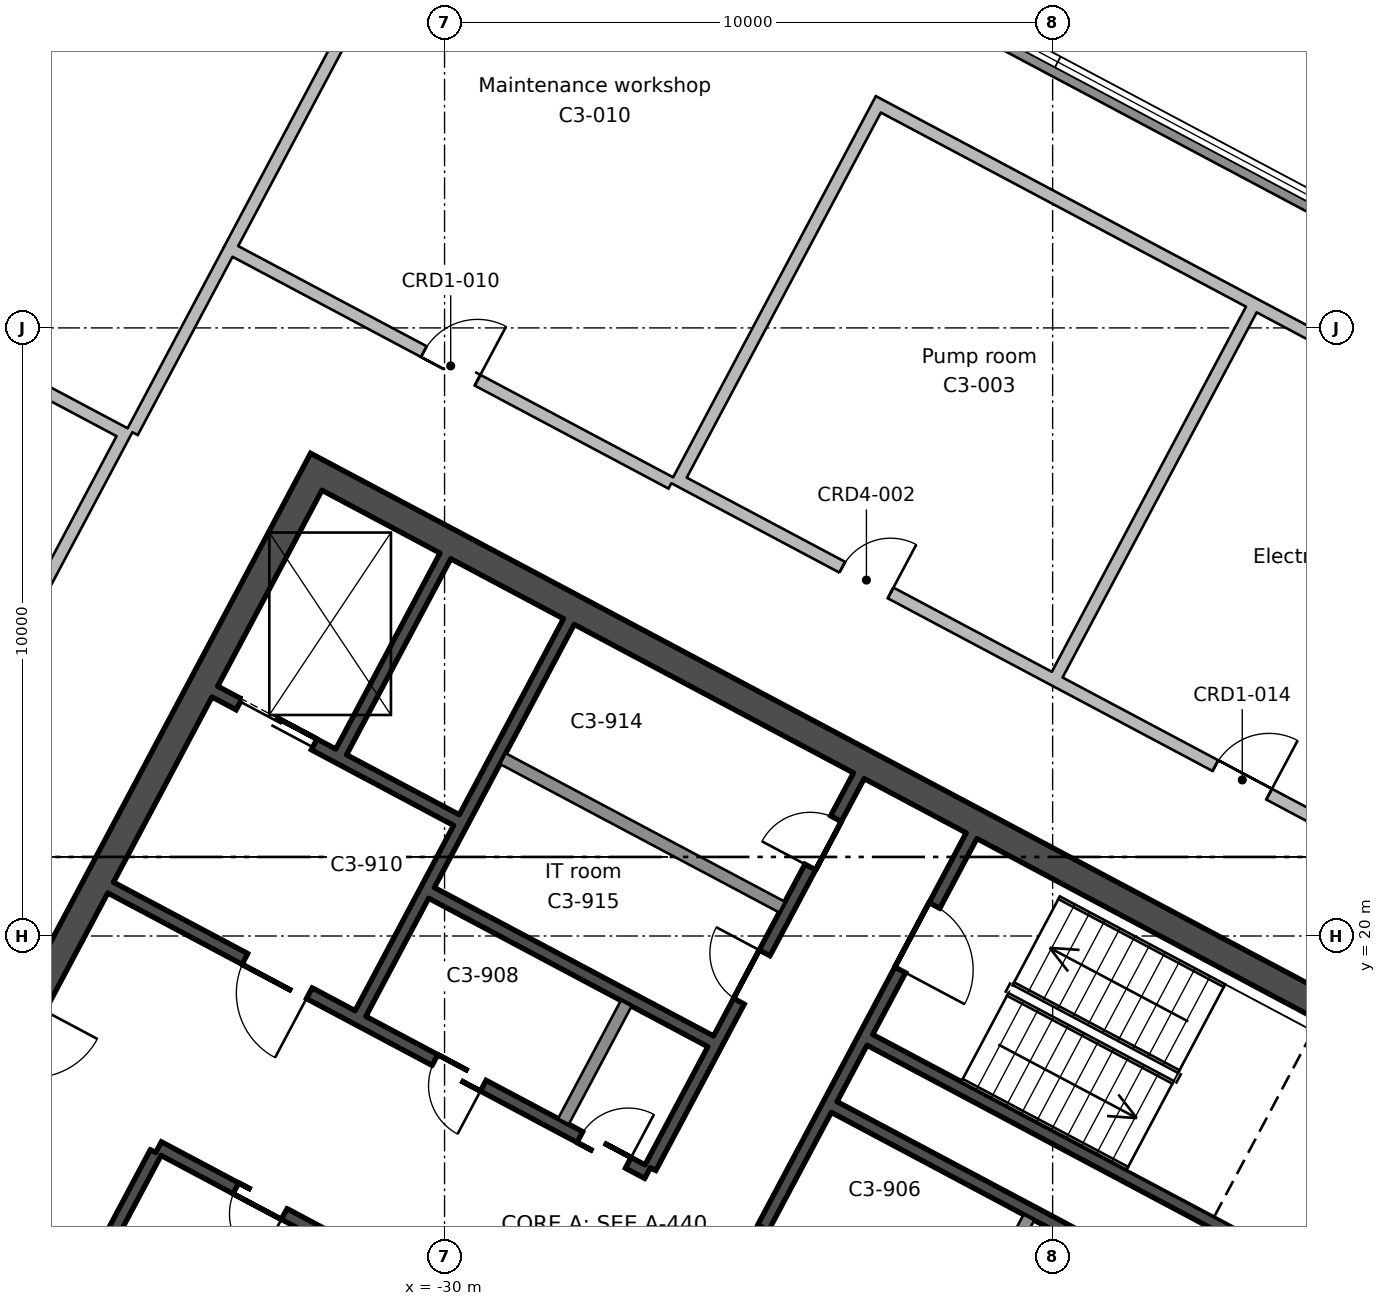
"""IFC4 building model, lengths in metres.
Left out: names, types, materials, properties, quantities, classifications, styles, units other than length and angle.
Written with IfcOpenShell. Run it as: python <this file> out.ifc"""

import sys

from ifc_helpers import new_model, si_unit, direction, frame, frame_2d, origin, place, context, subcontext, project, spatial, rectangle, extrude, element, fill, save


model = new_model("IFC4")
c1 = context("Model", 3, precision=1e-05, world=origin(), true_north=direction((0.0, 1.0)))
c2 = subcontext(c1, "Body", "Model", "MODEL_VIEW")
j1 = project(units=[si_unit("LENGTHUNIT", "METRE"), si_unit("PLANEANGLEUNIT", "RADIAN")], contexts=[c1])
p1 = place(None, origin())
s1 = spatial("IfcSite", under=j1, at=p1, CompositionType="ELEMENT")
p2 = place(p1, origin())
s2 = spatial("IfcBuilding", under=s1, at=p2, CompositionType="ELEMENT")
p3 = place(p2, frame((0.0, 0.0, 336.6)))
s3 = spatial("IfcBuildingStorey", under=s2, at=p3, CompositionType="ELEMENT", Elevation=336.6)
p4 = place(p3, frame((-13.771, 18.138, 0.0), z_axis=(0.0, 0.0, 1.0), x_axis=(-0.469467968382, -0.882949504028, 0.0)))
e1 = element("IfcWall", 1, at=p4, inside=s3, PredefinedType="SHEAR", context=c2, shape_type="SweptSolid", body=[
    extrude(rectangle(XDim=19.1, YDim=0.45, at=frame_2d((9.55, 0.0))), origin(), (0.0, 0.0, 1.0), 4.2),
])
p5 = place(p4, frame((6.55, 0.0, 0.0)))
e2 = element("IfcOpeningElement", 2, at=p5, cuts=e1, PredefinedType="OPENING", context=c2, shape_type="SweptSolid", body=[
    extrude(rectangle(XDim=2.4, YDim=2.4, at=frame_2d((1.2, 1.2))), frame((0.0, 0.235, 0.0), z_axis=(0.0, -1.0, 0.0), x_axis=(1.0, 0.0, 0.0)), (0.0, 0.0, 1.0), 0.47),
])
p6 = place(p3, frame((-32.004, 27.833, 0.0), z_axis=(0.0, 0.0, 1.0), x_axis=(-0.469467968382, -0.882949504028, 0.0)))
e3 = element("IfcWall", 3, at=p6, inside=s3, PredefinedType="SHEAR", context=c2, shape_type="SweptSolid", body=[
    extrude(rectangle(XDim=19.1, YDim=0.45, at=frame_2d((9.55, 0.0))), origin(), (0.0, 0.0, 1.0), 4.2),
])
p7 = place(p6, frame((10.15, 0.0, 0.0)))
e4 = element("IfcOpeningElement", 4, at=p7, cuts=e3, PredefinedType="OPENING", context=c2, shape_type="SweptSolid", body=[
    extrude(rectangle(XDim=2.4, YDim=2.4, at=frame_2d((1.2, 1.2))), frame((0.0, 0.235, 0.0), z_axis=(0.0, -1.0, 0.0), x_axis=(1.0, 0.0, 0.0)), (0.0, 0.0, 1.0), 0.47),
])
p8 = place(p3, frame((-14.076, 18.045, 0.0), z_axis=(0.0, 0.0, 1.0), x_axis=(-0.882947755831, 0.46947125628, 0.0)))
e5 = element("IfcWall", 5, at=p8, inside=s3, PredefinedType="SHEAR", context=c2, shape_type="SweptSolid", body=[
    extrude(rectangle(XDim=20.2, YDim=0.45, at=frame_2d((10.1, 0.0))), origin(), (0.0, 0.0, 1.0), 4.2),
])
p9 = place(p3, frame((-20.39, 15.372, 0.0), z_axis=(0.0, 0.0, 1.0), x_axis=(-0.4694473164, -0.882960484464, 0.0)))
e6 = element("IfcWall", 6, at=p9, inside=s3, PredefinedType="SOLIDWALL", context=c2, shape_type="SweptSolid", body=[
    extrude(rectangle(XDim=2.2, YDim=0.2, at=frame_2d((1.1, 0.0))), origin(), (0.0, 0.0, 1.0), 4.2),
])
p10 = place(p3, frame((-21.333, 21.649, 0.0), z_axis=(0.0, 0.0, 1.0), x_axis=(-0.469494272526, -0.882935517501, 0.0)))
e7 = element("IfcWall", 7, at=p10, inside=s3, PredefinedType="SHEAR", context=c2, shape_type="SweptSolid", body=[
    extrude(rectangle(XDim=7.3, YDim=0.2, at=frame_2d((3.65, 0.0))), origin(), (0.0, 0.0, 1.0), 4.2),
])
p11 = place(p10, frame((1.3, 0.0, 0.0)))
e8 = element("IfcOpeningElement", 8, at=p11, cuts=e7, PredefinedType="OPENING", context=c2, shape_type="SweptSolid", body=[
    extrude(rectangle(XDim=1.2, YDim=2.1, at=frame_2d((0.6, 1.05))), frame((0.0, 0.11, 0.0), z_axis=(0.0, -1.0, 0.0), x_axis=(1.0, 0.0, 0.0)), (0.0, 0.0, 1.0), 0.22),
])
p12 = place(p3, frame((-23.188, 22.635, 0.0), z_axis=(0.0, 0.0, 1.0), x_axis=(-0.469454336211, -0.882956752176, 0.0)))
e9 = element("IfcWall", 9, at=p12, inside=s3, PredefinedType="SHEAR", context=c2, shape_type="SweptSolid", body=[
    extrude(rectangle(XDim=7.3, YDim=0.2, at=frame_2d((3.65, 0.0))), origin(), (0.0, 0.0, 1.0), 4.2),
])
p13 = place(p12, frame((0.8, 0.0, 0.0)))
e10 = element("IfcOpeningElement", 10, at=p13, cuts=e9, PredefinedType="OPENING", context=c2, shape_type="SweptSolid", body=[
    extrude(rectangle(XDim=0.9, YDim=2.1, at=frame_2d((0.45, 1.05))), frame((0.0, 0.11, 0.0), z_axis=(0.0, -1.0, 0.0), x_axis=(1.0, 0.0, 0.0)), (0.0, 0.0, 1.0), 0.22),
])
p14 = place(p12, frame((3.3, 0.0, 0.0)))
e11 = element("IfcOpeningElement", 11, at=p14, cuts=e9, PredefinedType="OPENING", context=c2, shape_type="SweptSolid", body=[
    extrude(rectangle(XDim=0.9, YDim=2.1, at=frame_2d((0.45, 1.05))), frame((0.0, 0.11, 0.0), z_axis=(0.0, -1.0, 0.0), x_axis=(1.0, 0.0, 0.0)), (0.0, 0.0, 1.0), 0.22),
])
p15 = place(p3, frame((-27.012, 18.893, 0.0), z_axis=(0.0, 0.0, 1.0), x_axis=(-0.4694473164, -0.882960484464, 0.0)))
e12 = element("IfcWall", 12, at=p15, inside=s3, PredefinedType="SOLIDWALL", context=c2, shape_type="SweptSolid", body=[
    extrude(rectangle(XDim=2.2, YDim=0.2, at=frame_2d((1.1, 0.0))), origin(), (0.0, 0.0, 1.0), 4.2),
])
p16 = place(p3, frame((-27.955, 25.171, 0.0), z_axis=(0.0, 0.0, 1.0), x_axis=(-0.469480409012, -0.88294288918, 0.0)))
e13 = element("IfcWall", 13, at=p16, inside=s3, PredefinedType="SHEAR", context=c2, shape_type="SweptSolid", body=[
    extrude(rectangle(XDim=7.3, YDim=0.2, at=frame_2d((3.65, 0.0))), origin(), (0.0, 0.0, 1.0), 4.2),
])
p17 = place(p3, frame((-34.75, 16.438, 0.0), z_axis=(0.0, 0.0, 1.0), x_axis=(-0.469401318492, -0.882984938828, 0.0)))
e14 = element("IfcWall", 14, at=p17, inside=s3, PredefinedType="SHEAR", context=c2, shape_type="SweptSolid", body=[
    extrude(rectangle(XDim=2.2, YDim=0.2, at=frame_2d((1.1, 0.0))), origin(), (0.0, 0.0, 1.0), 4.2),
])
p18 = place(p3, frame((-29.986, 26.25, 0.0), z_axis=(0.0, 0.0, 1.0), x_axis=(-0.469494272526, -0.882935517501, 0.0)))
e15 = element("IfcWall", 15, at=p18, inside=s3, PredefinedType="SHEAR", context=c2, shape_type="SweptSolid", body=[
    extrude(rectangle(XDim=3.65, YDim=0.2, at=frame_2d((1.825, 0.0))), origin(), (0.0, 0.0, 1.0), 4.2),
])
p19 = place(p3, frame((-24.449, 20.475, 0.0), z_axis=(0.0, 0.0, 1.0), x_axis=(-0.882934506056, 0.469496174655, 0.0)))
e16 = element("IfcWall", 16, at=p19, inside=s3, PredefinedType="SOLIDWALL", context=c2, shape_type="SweptSolid", body=[
    extrude(rectangle(XDim=5.2, YDim=0.2, at=frame_2d((2.6, 0.0))), origin(), (0.0, 0.0, 1.0), 4.2),
])
p20 = place(p3, frame((-15.942, 14.536, 0.0), z_axis=(0.0, 0.0, 1.0), x_axis=(-0.882946947542, 0.469472776449, 0.0)))
e17 = element("IfcWall", 17, at=p20, inside=s3, PredefinedType="SHEAR", context=c2, shape_type="SweptSolid", body=[
    extrude(rectangle(XDim=8.0, YDim=0.2, at=frame_2d((4.0, 0.0))), origin(), (0.0, 0.0, 1.0), 4.2),
])
p21 = place(p3, frame((-29.804, 21.906, 0.0), z_axis=(0.0, 0.0, 1.0), x_axis=(-0.882960433586, 0.469447412093, 0.0)))
e18 = element("IfcWall", 18, at=p21, inside=s3, PredefinedType="SHEAR", context=c2, shape_type="SweptSolid", body=[
    extrude(rectangle(XDim=4.5, YDim=0.2, at=frame_2d((2.25, 0.0))), origin(), (0.0, 0.0, 1.0), 4.2),
])
p22 = place(p21, frame((2.65, 0.0, 0.0)))
e19 = element("IfcOpeningElement", 19, at=p22, cuts=e18, PredefinedType="OPENING", context=c2, shape_type="SweptSolid", body=[
    extrude(rectangle(XDim=1.4, YDim=2.4, at=frame_2d((0.7, 1.2))), frame((0.0, 0.11, 0.0), z_axis=(0.0, -1.0, 0.0), x_axis=(1.0, 0.0, 0.0)), (0.0, 0.0, 1.0), 0.22),
])
p23 = place(p3, frame((-16.529, 13.432, 0.0), z_axis=(0.0, 0.0, 1.0), x_axis=(-0.88295287151, 0.469461634952, 0.0)))
e20 = element("IfcWall", 20, at=p23, inside=s3, PredefinedType="SHEAR", context=c2, shape_type="SweptSolid", body=[
    extrude(rectangle(XDim=8.0, YDim=0.2, at=frame_2d((4.0, 0.0))), origin(), (0.0, 0.0, 1.0), 4.2),
])
p24 = place(p3, frame((-25.623, 18.268, 0.0), z_axis=(0.0, 0.0, 1.0), x_axis=(-0.882953967957, 0.469459572775, 0.0)))
e21 = element("IfcWall", 21, at=p24, inside=s3, PredefinedType="SHEAR", context=c2, shape_type="SweptSolid", body=[
    extrude(rectangle(XDim=5.2, YDim=0.2, at=frame_2d((2.6, 0.0))), origin(), (0.0, 0.0, 1.0), 4.2),
])
p25 = place(p3, frame((-26.662, 16.102, 0.0), z_axis=(0.0, 0.0, 1.0), x_axis=(-0.882940221191, 0.469485426614, 0.0)))
e22 = element("IfcWall", 22, at=p25, inside=s3, PredefinedType="SHEAR", context=c2, shape_type="SweptSolid", body=[
    extrude(rectangle(XDim=10.0, YDim=0.2, at=frame_2d((5.0, 0.0))), origin(), (0.0, 0.0, 1.0), 4.2),
])
p26 = place(p25, frame((6.3, 0.0, 0.0)))
e23 = element("IfcOpeningElement", 23, at=p26, cuts=e22, PredefinedType="OPENING", context=c2, shape_type="SweptSolid", body=[
    extrude(rectangle(XDim=1.2, YDim=2.1, at=frame_2d((0.6, 1.05))), frame((0.0, 0.11, 0.0), z_axis=(0.0, -1.0, 0.0), x_axis=(1.0, 0.0, 0.0)), (0.0, 0.0, 1.0), 0.22),
])
p27 = place(p25, frame((0.36, 0.0, 0.0)))
e24 = element("IfcOpeningElement", 24, at=p27, cuts=e22, PredefinedType="OPENING", context=c2, shape_type="SweptSolid", body=[
    extrude(rectangle(XDim=0.9, YDim=2.1, at=frame_2d((0.45, 1.05))), frame((0.0, 0.11, 0.0), z_axis=(0.0, -1.0, 0.0), x_axis=(1.0, 0.0, 0.0)), (0.0, 0.0, 1.0), 0.22),
])
p28 = place(p25, frame((3.06, 0.0, 0.0)))
e25 = element("IfcOpeningElement", 25, at=p28, cuts=e22, PredefinedType="OPENING", context=c2, shape_type="SweptSolid", body=[
    extrude(rectangle(XDim=0.9, YDim=2.1, at=frame_2d((0.45, 1.05))), frame((0.0, 0.11, 0.0), z_axis=(0.0, -1.0, 0.0), x_axis=(1.0, 0.0, 0.0)), (0.0, 0.0, 1.0), 0.22),
])
p29 = place(p3, frame((-29.935, 13.991, 0.0), z_axis=(0.0, 0.0, 1.0), x_axis=(-0.882952937579, 0.469461510692, 0.0)))
e26 = element("IfcWall", 26, at=p29, inside=s3, PredefinedType="SHEAR", context=c2, shape_type="SweptSolid", body=[
    extrude(rectangle(XDim=5.4, YDim=0.2, at=frame_2d((2.7, 0.0))), origin(), (0.0, 0.0, 1.0), 4.2),
])
p30 = place(p29, frame((0.36, 0.0, 0.0)))
e27 = element("IfcOpeningElement", 27, at=p30, cuts=e26, PredefinedType="OPENING", context=c2, shape_type="SweptSolid", body=[
    extrude(rectangle(XDim=0.9, YDim=2.1, at=frame_2d((0.45, 1.05))), frame((0.0, 0.11, 0.0), z_axis=(0.0, -1.0, 0.0), x_axis=(1.0, 0.0, 0.0)), (0.0, 0.0, 1.0), 0.22),
])
p31 = place(p29, frame((3.06, 0.0, 0.0)))
e28 = element("IfcOpeningElement", 28, at=p31, cuts=e26, PredefinedType="OPENING", context=c2, shape_type="SweptSolid", body=[
    extrude(rectangle(XDim=0.9, YDim=2.1, at=frame_2d((0.45, 1.05))), frame((0.0, 0.11, 0.0), z_axis=(0.0, -1.0, 0.0), x_axis=(1.0, 0.0, 0.0)), (0.0, 0.0, 1.0), 0.22),
])
p32 = place(p3, frame((-31.15, 11.919, 0.0), z_axis=(0.0, 0.0, 1.0), x_axis=(-0.882940221191, 0.469485426614, 0.0)))
e29 = element("IfcWall", 29, at=p32, inside=s3, PredefinedType="SHEAR", context=c2, shape_type="SweptSolid", body=[
    extrude(rectangle(XDim=8.0, YDim=0.2, at=frame_2d((4.0, 0.0))), origin(), (0.0, 0.0, 1.0), 4.2),
])
p33 = place(p3, frame((-29.918, 39.55, 0.0), z_axis=(0.0, 0.0, 1.0), x_axis=(0.882946997297, -0.469472682872, 0.0)))
e30 = element("IfcWall", 30, at=p33, inside=s3, PredefinedType="STANDARD", context=c2, shape_type="SweptSolid", body=[
    extrude(rectangle(XDim=33.884, YDim=0.25, at=frame_2d((16.942, 0.0))), origin(), (0.0, 0.0, 1.0), 3.8),
])
p34 = place(p3, frame((-10.417, 27.057, 0.0), z_axis=(0.0, 0.0, 1.0), x_axis=(-0.882947150019, 0.469472395646, 0.0)))
e31 = element("IfcWall", 31, at=p34, inside=s3, PredefinedType="PARTITIONING", context=c2, shape_type="SweptSolid", body=[
    extrude(rectangle(XDim=14.2, YDim=0.2, at=frame_2d((7.1, 0.0))), origin(), (0.0, 0.0, 1.0), 3.8),
])
p35 = place(p3, frame((-13.703, 20.877, 0.0), z_axis=(0.0, 0.0, 1.0), x_axis=(-0.882947150019, 0.469472395646, 0.0)))
e32 = element("IfcWall", 32, at=p35, inside=s3, PredefinedType="PARTITIONING", context=c2, shape_type="SweptSolid", body=[
    extrude(rectangle(XDim=14.2, YDim=0.2, at=frame_2d((7.1, 0.0))), origin(), (0.0, 0.0, 1.0), 3.8),
])
p36 = place(p35, frame((3.1, 0.0, 0.0)))
e33 = element("IfcOpeningElement", 33, at=p36, cuts=e32, PredefinedType="OPENING", context=c2, shape_type="SweptSolid", body=[
    extrude(rectangle(XDim=1.0, YDim=2.1, at=frame_2d((0.5, 1.05))), frame((0.0, 0.11, 0.0), z_axis=(0.0, -1.0, 0.0), x_axis=(1.0, 0.0, 0.0)), (0.0, 0.0, 1.0), 0.22),
])
p37 = place(p35, frame((10.15, 0.0, 0.0)))
e34 = element("IfcOpeningElement", 34, at=p37, cuts=e32, PredefinedType="OPENING", context=c2, shape_type="SweptSolid", body=[
    extrude(rectangle(XDim=0.9, YDim=2.1, at=frame_2d((0.45, 1.05))), frame((0.0, 0.11, 0.0), z_axis=(0.0, -1.0, 0.0), x_axis=(1.0, 0.0, 0.0)), (0.0, 0.0, 1.0), 0.22),
])
p38 = place(p3, frame((-35.171, 28.214, 0.0), z_axis=(0.0, 0.0, 1.0), x_axis=(-0.882952110828, 0.469463065622, 0.0)))
e35 = element("IfcWall", 35, at=p38, inside=s3, PredefinedType="PARTITIONING", context=c2, shape_type="SweptSolid", body=[
    extrude(rectangle(XDim=17.8, YDim=0.2, at=frame_2d((8.9, 0.0))), origin(), (0.0, 0.0, 1.0), 3.8),
])
p39 = place(p3, frame((-16.732, 30.302, 0.0), z_axis=(0.0, 0.0, 1.0), x_axis=(-0.469462324734, -0.882952504756, 0.0)))
e36 = element("IfcWall", 36, at=p39, inside=s3, PredefinedType="PARTITIONING", context=c2, shape_type="SweptSolid", body=[
    extrude(rectangle(XDim=6.8, YDim=0.2, at=frame_2d((3.4, 0.0))), origin(), (0.0, 0.0, 1.0), 3.8),
])
p40 = place(p3, frame((-22.913, 33.589, 0.0), z_axis=(0.0, 0.0, 1.0), x_axis=(-0.469477207229, -0.882944591632, 0.0)))
e37 = element("IfcWall", 37, at=p40, inside=s3, PredefinedType="PARTITIONING", context=c2, shape_type="SweptSolid", body=[
    extrude(rectangle(XDim=6.8, YDim=0.2, at=frame_2d((3.4, 0.0))), origin(), (0.0, 0.0, 1.0), 3.8),
])
p41 = place(p3, frame((-35.306, 28.173, 0.0), z_axis=(0.0, 0.0, 1.0), x_axis=(-0.469447393298, -0.882960443579, 0.0)))
e38 = element("IfcWall", 38, at=p41, inside=s3, PredefinedType="PARTITIONING", context=c2, shape_type="SweptSolid", body=[
    extrude(rectangle(XDim=11.2, YDim=0.2, at=frame_2d((5.6, 0.0))), origin(), (0.0, 0.0, 1.0), 3.8),
])
p42 = place(p3, frame((-35.133, 28.285, 0.0), z_axis=(0.0, 0.0, 1.0), x_axis=(0.469431829014, 0.882968718533, 0.0)))
e39 = element("IfcWall", 39, at=p42, inside=s3, PredefinedType="PARTITIONING", context=c2, shape_type="SweptSolid", body=[
    extrude(rectangle(XDim=3.42, YDim=0.2, at=frame_2d((1.71, 0.0))), origin(), (0.0, 0.0, 1.0), 3.8),
])
p43 = place(p3, frame((-33.528, 31.305, 0.0), z_axis=(0.0, 0.0, 1.0), x_axis=(0.882943382095, -0.469479481996, 0.0)))
e40 = element("IfcWall", 40, at=p43, inside=s3, PredefinedType="PARTITIONING", context=c2, shape_type="SweptSolid", body=[
    extrude(rectangle(XDim=8.22, YDim=0.2, at=frame_2d((4.11, 0.0))), origin(), (0.0, 0.0, 1.0), 3.8),
])
p44 = place(p43, frame((3.61, 0.0, 0.0)))
e41 = element("IfcOpeningElement", 41, at=p44, cuts=e40, PredefinedType="OPENING", context=c2, shape_type="SweptSolid", body=[
    extrude(rectangle(XDim=1.0, YDim=2.1, at=frame_2d((0.5, 1.05))), frame((0.0, 0.11, 0.0), z_axis=(0.0, -1.0, 0.0), x_axis=(1.0, 0.0, 0.0)), (0.0, 0.0, 1.0), 0.22),
])
p45 = place(p3, frame((-10.218, 18.911, 0.0), z_axis=(0.0, 0.0, 1.0), x_axis=(-0.469468702847, -0.882949113509, 0.0)))
e42 = element("IfcWall", 42, at=p45, inside=s3, PredefinedType="PARTITIONING", context=c2, shape_type="SweptSolid", body=[
    extrude(rectangle(XDim=23.8, YDim=0.2, at=frame_2d((11.9, 0.0))), origin(), (0.0, 0.0, 1.0), 3.8),
])
p46 = place(p45, frame((11.4, 0.0, 0.0)))
e43 = element("IfcOpeningElement", 43, at=p46, cuts=e42, PredefinedType="OPENING", context=c2, shape_type="SweptSolid", body=[
    extrude(rectangle(XDim=1.0, YDim=2.1, at=frame_2d((0.5, 1.05))), frame((0.0, 0.11, 0.0), z_axis=(0.0, -1.0, 0.0), x_axis=(1.0, 0.0, 0.0)), (0.0, 0.0, 1.0), 0.22),
])
p47 = place(p3, frame((-29.374, 39.119, 0.0), z_axis=(0.0, 0.0, 1.0), x_axis=(-0.469467804358, -0.88294959124, 0.0)))
e44 = element("IfcWall", 44, at=p47, inside=s3, PredefinedType="PARTITIONING", context=c2, shape_type="SweptSolid", body=[
    extrude(rectangle(XDim=8.87, YDim=0.2, at=frame_2d((4.435, 0.0))), origin(), (0.0, 0.0, 1.0), 3.8),
])
p48 = place(p26, origin())
e45 = element("IfcDoor", 45, at=p48, inside=s3, OperationType="SINGLE_SWING_LEFT", PredefinedType="DOOR", context=c2, shape_type="SweptSolid", body=[
    extrude(rectangle(XDim=1.2, YDim=2.1, at=frame_2d((0.6, 1.05))), frame((0.0, 0.025, 0.0), z_axis=(0.0, -1.0, 0.0), x_axis=(1.0, 0.0, 0.0)), (0.0, 0.0, 1.0), 0.05),
])
fill(e23, e45)
p49 = place(p11, origin())
e46 = element("IfcDoor", 46, at=p49, inside=s3, OperationType="SINGLE_SWING_RIGHT", PredefinedType="DOOR", context=c2, shape_type="SweptSolid", body=[
    extrude(rectangle(XDim=1.2, YDim=2.1, at=frame_2d((0.6, 1.05))), frame((0.0, 0.025, 0.0), z_axis=(0.0, -1.0, 0.0), x_axis=(1.0, 0.0, 0.0)), (0.0, 0.0, 1.0), 0.05),
])
fill(e8, e46)
p50 = place(p31, origin())
e47 = element("IfcDoor", 47, at=p50, inside=s3, OperationType="SINGLE_SWING_LEFT", PredefinedType="DOOR", context=c2, shape_type="SweptSolid", body=[
    extrude(rectangle(XDim=0.9, YDim=2.1, at=frame_2d((0.45, 1.05))), frame((0.0, 0.025, 0.0), z_axis=(0.0, -1.0, 0.0), x_axis=(1.0, 0.0, 0.0)), (0.0, 0.0, 1.0), 0.05),
])
fill(e28, e47)
p51 = place(p27, frame((0.9, 0.0, 0.0), z_axis=(0.0, 0.0, 1.0), x_axis=(-1.0, 0.0, 0.0)))
e48 = element("IfcDoor", 48, at=p51, inside=s3, OperationType="SINGLE_SWING_RIGHT", PredefinedType="DOOR", context=c2, shape_type="SweptSolid", body=[
    extrude(rectangle(XDim=0.9, YDim=2.1, at=frame_2d((0.45, 1.05))), frame((0.0, 0.025, 0.0), z_axis=(0.0, -1.0, 0.0), x_axis=(1.0, 0.0, 0.0)), (0.0, 0.0, 1.0), 0.05),
])
fill(e24, e48)
p52 = place(p28, origin())
e49 = element("IfcDoor", 49, at=p52, inside=s3, OperationType="SINGLE_SWING_LEFT", PredefinedType="DOOR", context=c2, shape_type="SweptSolid", body=[
    extrude(rectangle(XDim=0.9, YDim=2.1, at=frame_2d((0.45, 1.05))), frame((0.0, 0.025, 0.0), z_axis=(0.0, -1.0, 0.0), x_axis=(1.0, 0.0, 0.0)), (0.0, 0.0, 1.0), 0.05),
])
fill(e25, e49)
p53 = place(p22, origin())
e50 = element("IfcDoor", 50, at=p53, inside=s3, OperationType="DOUBLE_DOOR_SLIDING", PredefinedType="DOOR", context=c2, shape_type="SweptSolid", body=[
    extrude(rectangle(XDim=1.4, YDim=2.4, at=frame_2d((0.7, 1.2))), frame((0.0, 0.025, 0.0), z_axis=(0.0, -1.0, 0.0), x_axis=(1.0, 0.0, 0.0)), (0.0, 0.0, 1.0), 0.05),
])
fill(e19, e50)
p54 = place(p13, frame((0.9, 0.0, 0.0), z_axis=(0.0, 0.0, 1.0), x_axis=(-1.0, 0.0, 0.0)))
e51 = element("IfcDoor", 51, at=p54, inside=s3, OperationType="SINGLE_SWING_LEFT", PredefinedType="DOOR", context=c2, shape_type="SweptSolid", body=[
    extrude(rectangle(XDim=0.9, YDim=2.1, at=frame_2d((0.45, 1.05))), frame((0.0, 0.025, 0.0), z_axis=(0.0, -1.0, 0.0), x_axis=(1.0, 0.0, 0.0)), (0.0, 0.0, 1.0), 0.05),
])
fill(e10, e51)
p55 = place(p14, frame((0.9, 0.0, 0.0), z_axis=(0.0, 0.0, 1.0), x_axis=(-1.0, 0.0, 0.0)))
e52 = element("IfcDoor", 52, at=p55, inside=s3, OperationType="SINGLE_SWING_RIGHT", PredefinedType="DOOR", context=c2, shape_type="SweptSolid", body=[
    extrude(rectangle(XDim=0.9, YDim=2.1, at=frame_2d((0.45, 1.05))), frame((0.0, 0.025, 0.0), z_axis=(0.0, -1.0, 0.0), x_axis=(1.0, 0.0, 0.0)), (0.0, 0.0, 1.0), 0.05),
])
fill(e11, e52)
p56 = place(p36, frame((1.0, 0.0, 0.0), z_axis=(0.0, 0.0, 1.0), x_axis=(-1.0, 0.0, 0.0)))
e53 = element("IfcDoor", 53, at=p56, inside=s3, OperationType="SINGLE_SWING_RIGHT", PredefinedType="DOOR", context=c2, shape_type="SweptSolid", body=[
    extrude(rectangle(XDim=1.0, YDim=2.1, at=frame_2d((0.5, 1.05))), frame((0.0, 0.025, 0.0), z_axis=(0.0, -1.0, 0.0), x_axis=(1.0, 0.0, 0.0)), (0.0, 0.0, 1.0), 0.05),
])
fill(e33, e53)
p57 = place(p37, frame((0.9, 0.0, 0.0), z_axis=(0.0, 0.0, 1.0), x_axis=(-1.0, 0.0, 0.0)))
e54 = element("IfcDoor", 54, at=p57, inside=s3, OperationType="SINGLE_SWING_RIGHT", PredefinedType="DOOR", context=c2, shape_type="SweptSolid", body=[
    extrude(rectangle(XDim=0.9, YDim=2.1, at=frame_2d((0.45, 1.05))), frame((0.0, 0.025, 0.0), z_axis=(0.0, -1.0, 0.0), x_axis=(1.0, 0.0, 0.0)), (0.0, 0.0, 1.0), 0.05),
])
fill(e34, e54)
p58 = place(p44, origin())
e55 = element("IfcDoor", 55, at=p58, inside=s3, OperationType="SINGLE_SWING_RIGHT", PredefinedType="DOOR", context=c2, shape_type="SweptSolid", body=[
    extrude(rectangle(XDim=1.0, YDim=2.1, at=frame_2d((0.5, 1.05))), frame((0.0, 0.025, 0.0), z_axis=(0.0, -1.0, 0.0), x_axis=(1.0, 0.0, 0.0)), (0.0, 0.0, 1.0), 0.05),
])
fill(e41, e55)
save(model, sys.argv[1])
